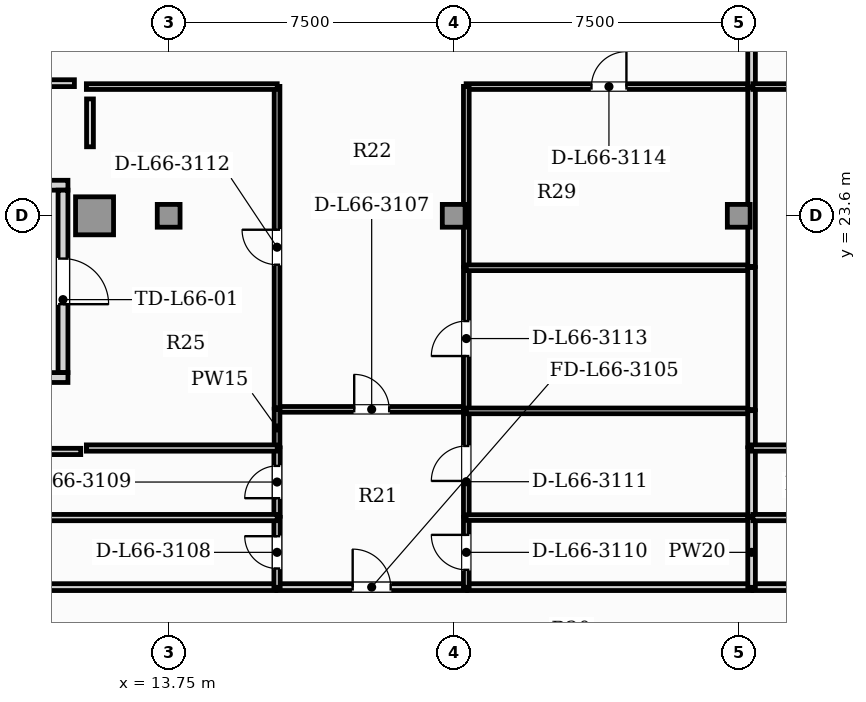
"""IFC4 building model, lengths in metres.
Left out: names, types, materials, properties, quantities, classifications, styles, units other than length and angle.
Written with IfcOpenShell. Run it as: python <this file> out.ifc"""

import sys

from ifc_helpers import new_model, si_unit, direction, frame, frame_2d, origin, origin_2d, place, context, subcontext, project, spatial, rectangle, hollow_rectangle, extrude, element, fill, save


model = new_model("IFC4")
c1 = context("Model", 3, precision=1e-05, world=origin(), true_north=direction((0.0, 1.0)))
c2 = subcontext(c1, "Body", "Model", "MODEL_VIEW")
j1 = project(units=[si_unit("LENGTHUNIT", "METRE"), si_unit("PLANEANGLEUNIT", "RADIAN")], contexts=[c1])
p1 = place(None, origin())
s1 = spatial("IfcSite", under=j1, at=p1, CompositionType="ELEMENT")
p2 = place(p1, origin())
s2 = spatial("IfcBuilding", under=s1, at=p2, CompositionType="ELEMENT")
p3 = place(p2, frame((0.0, 0.0, 268.3)))
s3 = spatial("IfcBuildingStorey", under=s2, at=p3, CompositionType="ELEMENT", Elevation=268.3)
p4 = place(p3, frame((11.8, 23.6, 0.0), z_axis=(0.0, 0.0, 1.0), x_axis=(1.0, 0.0, 0.0)))
e1 = element("IfcColumn", 1, at=p4, inside=s3, PredefinedType="USERDEFINED", context=c2, shape_type="SweptSolid", body=[
    extrude(hollow_rectangle(XDim=1.0, YDim=1.0, WallThickness=0.06, at=origin_2d()), origin(), (0.0, 0.0, 1.0), 3.85),
])
for number, where, z_axis, x_axis in (
    (2, (13.75, 23.6, 0.0), (0.0, 0.0, 1.0), (1.0, 0.0, 0.0)),
    (3, (21.25, 23.6, 0.0), (0.0, 0.0, 1.0), (1.0, 0.0, 0.0)),
    (4, (28.75, 23.6, 0.0), (0.0, 0.0, 1.0), (1.0, 0.0, 0.0)),
):
    element("IfcColumn", number, at=place(p3, frame(where, z_axis=z_axis, x_axis=x_axis)), inside=s3, PredefinedType="COLUMN", context=c2, shape_type="SweptSolid", body=[
        extrude(rectangle(XDim=0.6, YDim=0.6, at=origin_2d()), origin(), (0.0, 0.0, 1.0), 3.85),
    ])
p5 = place(p3, frame((8.18, 24.405, 0.0), z_axis=(0.0, 0.0, 1.0), x_axis=(1.0, 0.0, 0.0)))
e5 = element("IfcWall", 5, at=p5, inside=s3, PredefinedType="SOLIDWALL", context=c2, shape_type="SweptSolid", body=[
    extrude(rectangle(XDim=2.92, YDim=0.26, at=frame_2d((1.46, 0.0))), origin(), (0.0, 0.0, 1.0), 3.65),
])
p6 = place(p3, frame((10.97, 24.275, 0.0), z_axis=(0.0, 0.0, 1.0), x_axis=(0.0, -1.0, 0.0)))
e6 = element("IfcWall", 6, at=p6, inside=s3, PredefinedType="SOLIDWALL", context=c2, shape_type="SweptSolid", body=[
    extrude(rectangle(XDim=4.8, YDim=0.26, at=frame_2d((2.4, 0.0))), origin(), (0.0, 0.0, 1.0), 3.19),
])
p7 = place(p6, frame((1.8, 0.0, 0.0)))
e7 = element("IfcOpeningElement", 7, at=p7, cuts=e6, PredefinedType="OPENING", context=c2, shape_type="SweptSolid", body=[
    extrude(rectangle(XDim=1.2, YDim=2.2, at=frame_2d((0.6, 1.1))), frame((0.0, 0.14, 0.0), z_axis=(0.0, -1.0, 0.0), x_axis=(1.0, 0.0, 0.0)), (0.0, 0.0, 1.0), 0.28),
])
p8 = place(p3, frame((11.1, 19.345, 0.0), z_axis=(0.0, 0.0, 1.0), x_axis=(-1.0, 0.0, 0.0)))
e8 = element("IfcWall", 8, at=p8, inside=s3, PredefinedType="SOLIDWALL", context=c2, shape_type="SweptSolid", body=[
    extrude(rectangle(XDim=2.92, YDim=0.26, at=frame_2d((1.46, 0.0))), origin(), (0.0, 0.0, 1.0), 3.65),
])
p9 = place(p3, frame((16.597, 13.83, 0.0), z_axis=(0.0, 0.0, 1.0), x_axis=(1.0, 0.0, 0.0)))
e9 = element("IfcWall", 9, at=p9, inside=s3, PredefinedType="PARTITIONING", context=c2, shape_type="SweptSolid", body=[
    extrude(rectangle(XDim=4.99, YDim=0.18, at=frame_2d((2.495, 0.0))), origin(), (0.0, 0.0, 1.0), 3.65),
])
p10 = place(p9, frame((1.995, 0.0, 0.0)))
e10 = element("IfcOpeningElement", 10, at=p10, cuts=e9, PredefinedType="OPENING", context=c2, shape_type="SweptSolid", body=[
    extrude(rectangle(XDim=1.0, YDim=2.15, at=frame_2d((0.5, 1.075))), frame((0.0, 0.1, 0.0), z_axis=(0.0, -1.0, 0.0), x_axis=(1.0, 0.0, 0.0)), (0.0, 0.0, 1.0), 0.2),
])
p11 = place(p3, frame((8.289, 13.83, 0.0), z_axis=(0.0, 0.0, 1.0), x_axis=(1.0, 0.0, 0.0)))
e11 = element("IfcWall", 11, at=p11, inside=s3, PredefinedType="PARTITIONING", context=c2, shape_type="SweptSolid", body=[
    extrude(rectangle(XDim=8.278, YDim=0.18, at=frame_2d((4.139, 0.0))), origin(), (0.0, 0.0, 1.0), 3.65),
])
p12 = place(p3, frame((21.617, 13.83, 0.0), z_axis=(0.0, 0.0, 1.0), x_axis=(1.0, 0.0, 0.0)))
e12 = element("IfcWall", 12, at=p12, inside=s3, PredefinedType="PARTITIONING", context=c2, shape_type="SweptSolid", body=[
    extrude(rectangle(XDim=7.476, YDim=0.18, at=frame_2d((3.738, 0.0))), origin(), (0.0, 0.0, 1.0), 3.65),
])
p13 = place(p3, frame((29.123, 13.83, 0.0), z_axis=(0.0, 0.0, 1.0), x_axis=(1.0, 0.0, 0.0)))
e13 = element("IfcWall", 13, at=p13, inside=s3, PredefinedType="PARTITIONING", context=c2, shape_type="SweptSolid", body=[
    extrude(rectangle(XDim=7.181, YDim=0.18, at=frame_2d((3.591, 0.0))), origin(), (0.0, 0.0, 1.0), 3.65),
])
p14 = place(p3, frame((16.597, 18.507, 0.0), z_axis=(0.0, 0.0, 1.0), x_axis=(1.0, 0.0, 0.0)))
e14 = element("IfcWall", 14, at=p14, inside=s3, PredefinedType="PARTITIONING", context=c2, shape_type="SweptSolid", body=[
    extrude(rectangle(XDim=4.99, YDim=0.15, at=frame_2d((2.495, 0.0))), origin(), (0.0, 0.0, 1.0), 3.65),
])
p15 = place(p14, frame((2.035, 0.0, 0.0)))
e15 = element("IfcOpeningElement", 15, at=p15, cuts=e14, PredefinedType="OPENING", context=c2, shape_type="SweptSolid", body=[
    extrude(rectangle(XDim=0.92, YDim=2.1, at=frame_2d((0.46, 1.05))), frame((0.0, 0.085, 0.0), z_axis=(0.0, -1.0, 0.0), x_axis=(1.0, 0.0, 0.0)), (0.0, 0.0, 1.0), 0.17),
])
p16 = place(p3, frame((16.602, 13.825, 0.0), z_axis=(0.0, 0.0, 1.0), x_axis=(0.0, 1.0, 0.0)))
e16 = element("IfcWall", 16, at=p16, inside=s3, PredefinedType="PLUMBINGWALL", context=c2, shape_type="SweptSolid", body=[
    extrude(rectangle(XDim=1.84, YDim=0.165, at=frame_2d((0.92, 0.0))), origin(), (0.0, 0.0, 1.0), 3.65),
])
p17 = place(p16, frame((0.495, 0.0, 0.0)))
e17 = element("IfcOpeningElement", 17, at=p17, cuts=e16, PredefinedType="OPENING", context=c2, shape_type="SweptSolid", body=[
    extrude(rectangle(XDim=0.85, YDim=2.1, at=frame_2d((0.425, 1.05))), frame((0.0, 0.093, 0.0), z_axis=(0.0, -1.0, 0.0), x_axis=(1.0, 0.0, 0.0)), (0.0, 0.0, 1.0), 0.185),
])
p18 = place(p3, frame((16.602, 15.695, 0.0), z_axis=(0.0, 0.0, 1.0), x_axis=(0.0, 1.0, 0.0)))
e18 = element("IfcWall", 18, at=p18, inside=s3, PredefinedType="PLUMBINGWALL", context=c2, shape_type="SweptSolid", body=[
    extrude(rectangle(XDim=1.8, YDim=0.165, at=frame_2d((0.9, 0.0))), origin(), (0.0, 0.0, 1.0), 3.65),
])
p19 = place(p18, frame((0.475, 0.0, 0.0)))
e19 = element("IfcOpeningElement", 19, at=p19, cuts=e18, PredefinedType="OPENING", context=c2, shape_type="SweptSolid", body=[
    extrude(rectangle(XDim=0.85, YDim=2.1, at=frame_2d((0.425, 1.05))), frame((0.0, 0.093, 0.0), z_axis=(0.0, -1.0, 0.0), x_axis=(1.0, 0.0, 0.0)), (0.0, 0.0, 1.0), 0.185),
])
p20 = place(p3, frame((16.602, 17.525, 0.0), z_axis=(0.0, 0.0, 1.0), x_axis=(0.0, 1.0, 0.0)))
e20 = element("IfcWall", 20, at=p20, inside=s3, PredefinedType="PARTITIONING", context=c2, shape_type="SweptSolid", body=[
    extrude(rectangle(XDim=0.987, YDim=0.15, at=frame_2d((0.494, 0.0))), origin(), (0.0, 0.0, 1.0), 3.65),
])
p21 = place(p3, frame((21.582, 13.825, 0.0), z_axis=(0.0, 0.0, 1.0), x_axis=(0.0, 1.0, 0.0)))
e21 = element("IfcWall", 21, at=p21, inside=s3, PredefinedType="PARTITIONING", context=c2, shape_type="SweptSolid", body=[
    extrude(rectangle(XDim=1.84, YDim=0.15, at=frame_2d((0.92, 0.0))), origin(), (0.0, 0.0, 1.0), 3.65),
])
p22 = place(p21, frame((0.46, 0.0, 0.0)))
e22 = element("IfcOpeningElement", 22, at=p22, cuts=e21, PredefinedType="OPENING", context=c2, shape_type="SweptSolid", body=[
    extrude(rectangle(XDim=0.92, YDim=2.1, at=frame_2d((0.46, 1.05))), frame((0.0, 0.085, 0.0), z_axis=(0.0, -1.0, 0.0), x_axis=(1.0, 0.0, 0.0)), (0.0, 0.0, 1.0), 0.17),
])
p23 = place(p3, frame((21.582, 15.695, 0.0), z_axis=(0.0, 0.0, 1.0), x_axis=(0.0, 1.0, 0.0)))
e23 = element("IfcWall", 23, at=p23, inside=s3, PredefinedType="PARTITIONING", context=c2, shape_type="SweptSolid", body=[
    extrude(rectangle(XDim=2.777, YDim=0.15, at=frame_2d((1.389, 0.0))), origin(), (0.0, 0.0, 1.0), 3.65),
])
p24 = place(p23, frame((0.929, 0.0, 0.0)))
e24 = element("IfcOpeningElement", 24, at=p24, cuts=e23, PredefinedType="OPENING", context=c2, shape_type="SweptSolid", body=[
    extrude(rectangle(XDim=0.92, YDim=2.1, at=frame_2d((0.46, 1.05))), frame((0.0, 0.085, 0.0), z_axis=(0.0, -1.0, 0.0), x_axis=(1.0, 0.0, 0.0)), (0.0, 0.0, 1.0), 0.17),
])
p25 = place(p3, frame((16.602, 18.542, 0.0), z_axis=(0.0, 0.0, 1.0), x_axis=(0.0, 1.0, 0.0)))
e25 = element("IfcWall", 25, at=p25, inside=s3, PredefinedType="PARTITIONING", context=c2, shape_type="SweptSolid", body=[
    extrude(rectangle(XDim=8.463, YDim=0.15, at=frame_2d((4.231, 0.0))), origin(), (0.0, 0.0, 1.0), 3.65),
])
p26 = place(p25, frame((3.771, 0.0, 0.0)))
e26 = element("IfcOpeningElement", 26, at=p26, cuts=e25, PredefinedType="OPENING", context=c2, shape_type="SweptSolid", body=[
    extrude(rectangle(XDim=0.92, YDim=2.1, at=frame_2d((0.46, 1.05))), frame((0.0, 0.085, 0.0), z_axis=(0.0, -1.0, 0.0), x_axis=(1.0, 0.0, 0.0)), (0.0, 0.0, 1.0), 0.17),
])
p27 = place(p3, frame((11.585, 27.0, 0.0), z_axis=(0.0, 0.0, 1.0), x_axis=(1.0, 0.0, 0.0)))
e27 = element("IfcWall", 27, at=p27, inside=s3, PredefinedType="PARTITIONING", context=c2, shape_type="SweptSolid", body=[
    extrude(rectangle(XDim=5.022, YDim=0.15, at=frame_2d((2.511, 0.0))), origin(), (0.0, 0.0, 1.0), 3.65),
])
p28 = place(p3, frame((21.582, 18.502, 0.0), z_axis=(0.0, 0.0, 1.0), x_axis=(0.0, 1.0, 0.0)))
e28 = element("IfcWall", 28, at=p28, inside=s3, PredefinedType="PARTITIONING", context=c2, shape_type="SweptSolid", body=[
    extrude(rectangle(XDim=3.736, YDim=0.15, at=frame_2d((1.868, 0.0))), origin(), (0.0, 0.0, 1.0), 3.65),
])
p29 = place(p28, frame((1.408, 0.0, 0.0)))
e29 = element("IfcOpeningElement", 29, at=p29, cuts=e28, PredefinedType="OPENING", context=c2, shape_type="SweptSolid", body=[
    extrude(rectangle(XDim=0.92, YDim=2.1, at=frame_2d((0.46, 1.05))), frame((0.0, 0.085, 0.0), z_axis=(0.0, -1.0, 0.0), x_axis=(1.0, 0.0, 0.0)), (0.0, 0.0, 1.0), 0.17),
])
p30 = place(p3, frame((21.577, 27.0, 0.0), z_axis=(0.0, 0.0, 1.0), x_axis=(1.0, 0.0, 0.0)))
e30 = element("IfcWall", 30, at=p30, inside=s3, PredefinedType="PARTITIONING", context=c2, shape_type="SweptSolid", body=[
    extrude(rectangle(XDim=7.516, YDim=0.15, at=frame_2d((3.758, 0.0))), origin(), (0.0, 0.0, 1.0), 3.65),
])
p31 = place(p30, frame((3.298, 0.0, 0.0)))
e31 = element("IfcOpeningElement", 31, at=p31, cuts=e30, PredefinedType="OPENING", context=c2, shape_type="SweptSolid", body=[
    extrude(rectangle(XDim=0.92, YDim=2.1, at=frame_2d((0.46, 1.05))), frame((0.0, 0.085, 0.0), z_axis=(0.0, -1.0, 0.0), x_axis=(1.0, 0.0, 0.0)), (0.0, 0.0, 1.0), 0.17),
])
p32 = place(p3, frame((21.582, 22.268, 0.0), z_axis=(0.0, 0.0, 1.0), x_axis=(0.0, 1.0, 0.0)))
e32 = element("IfcWall", 32, at=p32, inside=s3, PredefinedType="PARTITIONING", context=c2, shape_type="SweptSolid", body=[
    extrude(rectangle(XDim=4.737, YDim=0.15, at=frame_2d((2.368, 0.0))), origin(), (0.0, 0.0, 1.0), 3.65),
])
p33 = place(p3, frame((29.088, 26.995, 0.0), z_axis=(0.0, 0.0, 1.0), x_axis=(0.0, 1.0, 0.0)))
e33 = element("IfcWall", 33, at=p33, inside=s3, PredefinedType="PARTITIONING", context=c2, shape_type="SweptSolid", body=[
    extrude(rectangle(XDim=1.51, YDim=0.2, at=frame_2d((0.755, 0.0))), origin(), (0.0, 0.0, 1.0), 3.65),
])
p34 = place(p3, frame((8.289, 15.66, 0.0), z_axis=(0.0, 0.0, 1.0), x_axis=(1.0, 0.0, 0.0)))
e34 = element("IfcWall", 34, at=p34, inside=s3, PredefinedType="PLUMBINGWALL", context=c2, shape_type="SweptSolid", body=[
    extrude(rectangle(XDim=8.318, YDim=0.165, at=frame_2d((4.159, 0.0))), origin(), (0.0, 0.0, 1.0), 3.65),
])
p35 = place(p3, frame((11.585, 17.49, 0.0), z_axis=(0.0, 0.0, 1.0), x_axis=(1.0, 0.0, 0.0)))
e35 = element("IfcWall", 35, at=p35, inside=s3, PredefinedType="PLUMBINGWALL", context=c2, shape_type="SweptSolid", body=[
    extrude(rectangle(XDim=5.022, YDim=0.165, at=frame_2d((2.511, 0.0))), origin(), (0.0, 0.0, 1.0), 3.65),
])
p36 = place(p3, frame((21.577, 15.66, 0.0), z_axis=(0.0, 0.0, 1.0), x_axis=(1.0, 0.0, 0.0)))
e36 = element("IfcWall", 36, at=p36, inside=s3, PredefinedType="PARTITIONING", context=c2, shape_type="SweptSolid", body=[
    extrude(rectangle(XDim=7.516, YDim=0.15, at=frame_2d((3.758, 0.0))), origin(), (0.0, 0.0, 1.0), 3.65),
])
p37 = place(p3, frame((29.088, 13.825, 0.0), z_axis=(0.0, 0.0, 1.0), x_axis=(0.0, 1.0, 0.0)))
e37 = element("IfcWall", 37, at=p37, inside=s3, PredefinedType="PARTITIONING", context=c2, shape_type="SweptSolid", body=[
    extrude(rectangle(XDim=1.84, YDim=0.2, at=frame_2d((0.92, 0.0))), origin(), (0.0, 0.0, 1.0), 3.65),
])
p38 = place(p3, frame((21.577, 18.468, 0.0), z_axis=(0.0, 0.0, 1.0), x_axis=(1.0, 0.0, 0.0)))
e38 = element("IfcWall", 38, at=p38, inside=s3, PredefinedType="PARTITIONING", context=c2, shape_type="SweptSolid", body=[
    extrude(rectangle(XDim=7.516, YDim=0.15, at=frame_2d((3.758, 0.0))), origin(), (0.0, 0.0, 1.0), 3.65),
])
p39 = place(p3, frame((29.088, 15.695, 0.0), z_axis=(0.0, 0.0, 1.0), x_axis=(0.0, 1.0, 0.0)))
e39 = element("IfcWall", 39, at=p39, inside=s3, PredefinedType="PARTITIONING", context=c2, shape_type="SweptSolid", body=[
    extrude(rectangle(XDim=1.8, YDim=0.2, at=frame_2d((0.9, 0.0))), origin(), (0.0, 0.0, 1.0), 3.65),
])
p40 = place(p3, frame((29.088, 17.525, 0.0), z_axis=(0.0, 0.0, 1.0), x_axis=(0.0, 1.0, 0.0)))
e40 = element("IfcWall", 40, at=p40, inside=s3, PredefinedType="PARTITIONING", context=c2, shape_type="SweptSolid", body=[
    extrude(rectangle(XDim=0.948, YDim=0.2, at=frame_2d((0.474, 0.0))), origin(), (0.0, 0.0, 1.0), 3.65),
])
p41 = place(p3, frame((21.577, 22.233, 0.0), z_axis=(0.0, 0.0, 1.0), x_axis=(1.0, 0.0, 0.0)))
e41 = element("IfcWall", 41, at=p41, inside=s3, PredefinedType="PARTITIONING", context=c2, shape_type="SweptSolid", body=[
    extrude(rectangle(XDim=7.516, YDim=0.15, at=frame_2d((3.758, 0.0))), origin(), (0.0, 0.0, 1.0), 3.65),
])
p42 = place(p3, frame((29.088, 18.502, 0.0), z_axis=(0.0, 0.0, 1.0), x_axis=(0.0, 1.0, 0.0)))
e42 = element("IfcWall", 42, at=p42, inside=s3, PredefinedType="PARTITIONING", context=c2, shape_type="SweptSolid", body=[
    extrude(rectangle(XDim=3.736, YDim=0.2, at=frame_2d((1.868, 0.0))), origin(), (0.0, 0.0, 1.0), 3.65),
])
p43 = place(p3, frame((29.088, 22.268, 0.0), z_axis=(0.0, 0.0, 1.0), x_axis=(0.0, 1.0, 0.0)))
e43 = element("IfcWall", 43, at=p43, inside=s3, PredefinedType="PARTITIONING", context=c2, shape_type="SweptSolid", body=[
    extrude(rectangle(XDim=4.697, YDim=0.2, at=frame_2d((2.349, 0.0))), origin(), (0.0, 0.0, 1.0), 3.65),
])
p44 = place(p3, frame((29.123, 27.0, 0.0), z_axis=(0.0, 0.0, 1.0), x_axis=(1.0, 0.0, 0.0)))
e44 = element("IfcWall", 44, at=p44, inside=s3, PredefinedType="PARTITIONING", context=c2, shape_type="SweptSolid", body=[
    extrude(rectangle(XDim=7.221, YDim=0.15, at=frame_2d((3.611, 0.0))), origin(), (0.0, 0.0, 1.0), 3.65),
])
p45 = place(p3, frame((29.123, 15.66, 0.0), z_axis=(0.0, 0.0, 1.0), x_axis=(1.0, 0.0, 0.0)))
e45 = element("IfcWall", 45, at=p45, inside=s3, PredefinedType="PLUMBINGWALL", context=c2, shape_type="SweptSolid", body=[
    extrude(rectangle(XDim=7.221, YDim=0.165, at=frame_2d((3.611, 0.0))), origin(), (0.0, 0.0, 1.0), 3.65),
])
p46 = place(p3, frame((29.083, 17.49, 0.0), z_axis=(0.0, 0.0, 1.0), x_axis=(1.0, 0.0, 0.0)))
e46 = element("IfcWall", 46, at=p46, inside=s3, PredefinedType="PLUMBINGWALL", context=c2, shape_type="SweptSolid", body=[
    extrude(rectangle(XDim=7.261, YDim=0.165, at=frame_2d((3.631, 0.0))), origin(), (0.0, 0.0, 1.0), 3.65),
])
p47 = place(p3, frame((11.27, 27.09, 0.0), z_axis=(0.0, 0.0, 1.0), x_axis=(-1.0, 0.0, 0.0)))
e47 = element("IfcWall", 47, at=p47, inside=s3, PredefinedType="PARTITIONING", context=c2, shape_type="SweptSolid", body=[
    extrude(rectangle(XDim=2.981, YDim=0.18, at=frame_2d((1.49, 0.0))), origin(), (0.0, 0.0, 1.0), 3.65),
])
p48 = place(p3, frame((8.289, 17.4, 0.0), z_axis=(0.0, 0.0, 1.0), x_axis=(1.0, 0.0, 0.0)))
e48 = element("IfcWall", 48, at=p48, inside=s3, PredefinedType="PLUMBINGWALL", context=c2, shape_type="SweptSolid", body=[
    extrude(rectangle(XDim=3.147, YDim=0.165, at=frame_2d((1.573, 0.0))), origin(), (0.0, 0.0, 1.0), 3.65),
])
p49 = place(p3, frame((11.68, 25.417, 0.0), z_axis=(0.0, 0.0, 1.0), x_axis=(0.0, 1.0, 0.0)))
e49 = element("IfcWall", 49, at=p49, inside=s3, PredefinedType="PARTITIONING", context=c2, shape_type="SweptSolid", body=[
    extrude(rectangle(XDim=1.259, YDim=0.18, at=frame_2d((0.629, 0.0))), origin(), (0.0, 0.0, 1.0), 3.65),
])
p50 = place(p7, frame((1.2, 0.0, 0.0), z_axis=(0.0, 0.0, 1.0), x_axis=(-1.0, 0.0, 0.0)))
e50 = element("IfcDoor", 50, at=p50, inside=s3, OperationType="SINGLE_SWING_LEFT", PredefinedType="DOOR", context=c2, shape_type="SweptSolid", body=[
    extrude(rectangle(XDim=1.2, YDim=2.2, at=frame_2d((0.6, 1.1))), frame((0.0, 0.025, 0.0), z_axis=(0.0, -1.0, 0.0), x_axis=(1.0, 0.0, 0.0)), (0.0, 0.0, 1.0), 0.05),
])
fill(e7, e50)
p51 = place(p10, origin())
e51 = element("IfcDoor", 51, at=p51, inside=s3, OperationType="SINGLE_SWING_LEFT", PredefinedType="DOOR", context=c2, shape_type="SweptSolid", body=[
    extrude(rectangle(XDim=1.0, YDim=2.15, at=frame_2d((0.5, 1.075))), frame((0.0, 0.025, 0.0), z_axis=(0.0, -1.0, 0.0), x_axis=(1.0, 0.0, 0.0)), (0.0, 0.0, 1.0), 0.05),
])
fill(e10, e51)
p52 = place(p15, origin())
e52 = element("IfcDoor", 52, at=p52, inside=s3, OperationType="SINGLE_SWING_LEFT", PredefinedType="DOOR", context=c2, shape_type="SweptSolid", body=[
    extrude(rectangle(XDim=0.92, YDim=2.1, at=frame_2d((0.46, 1.05))), frame((0.0, 0.025, 0.0), z_axis=(0.0, -1.0, 0.0), x_axis=(1.0, 0.0, 0.0)), (0.0, 0.0, 1.0), 0.05),
])
fill(e15, e52)
p53 = place(p17, origin())
e53 = element("IfcDoor", 53, at=p53, inside=s3, OperationType="SINGLE_SWING_RIGHT", PredefinedType="DOOR", context=c2, shape_type="SweptSolid", body=[
    extrude(rectangle(XDim=0.85, YDim=2.1, at=frame_2d((0.425, 1.05))), frame((0.0, 0.025, 0.0), z_axis=(0.0, -1.0, 0.0), x_axis=(1.0, 0.0, 0.0)), (0.0, 0.0, 1.0), 0.05),
])
fill(e17, e53)
p54 = place(p19, origin())
e54 = element("IfcDoor", 54, at=p54, inside=s3, OperationType="SINGLE_SWING_LEFT", PredefinedType="DOOR", context=c2, shape_type="SweptSolid", body=[
    extrude(rectangle(XDim=0.85, YDim=2.1, at=frame_2d((0.425, 1.05))), frame((0.0, 0.025, 0.0), z_axis=(0.0, -1.0, 0.0), x_axis=(1.0, 0.0, 0.0)), (0.0, 0.0, 1.0), 0.05),
])
fill(e19, e54)
p55 = place(p22, origin())
e55 = element("IfcDoor", 55, at=p55, inside=s3, OperationType="SINGLE_SWING_RIGHT", PredefinedType="DOOR", context=c2, shape_type="SweptSolid", body=[
    extrude(rectangle(XDim=0.92, YDim=2.1, at=frame_2d((0.46, 1.05))), frame((0.0, 0.025, 0.0), z_axis=(0.0, -1.0, 0.0), x_axis=(1.0, 0.0, 0.0)), (0.0, 0.0, 1.0), 0.05),
])
fill(e22, e55)
p56 = place(p24, origin())
e56 = element("IfcDoor", 56, at=p56, inside=s3, OperationType="SINGLE_SWING_LEFT", PredefinedType="DOOR", context=c2, shape_type="SweptSolid", body=[
    extrude(rectangle(XDim=0.92, YDim=2.1, at=frame_2d((0.46, 1.05))), frame((0.0, 0.025, 0.0), z_axis=(0.0, -1.0, 0.0), x_axis=(1.0, 0.0, 0.0)), (0.0, 0.0, 1.0), 0.05),
])
fill(e24, e56)
p57 = place(p26, origin())
e57 = element("IfcDoor", 57, at=p57, inside=s3, OperationType="SINGLE_SWING_RIGHT", PredefinedType="DOOR", context=c2, shape_type="SweptSolid", body=[
    extrude(rectangle(XDim=0.92, YDim=2.1, at=frame_2d((0.46, 1.05))), frame((0.0, 0.025, 0.0), z_axis=(0.0, -1.0, 0.0), x_axis=(1.0, 0.0, 0.0)), (0.0, 0.0, 1.0), 0.05),
])
fill(e26, e57)
p58 = place(p29, origin())
e58 = element("IfcDoor", 58, at=p58, inside=s3, OperationType="SINGLE_SWING_LEFT", PredefinedType="DOOR", context=c2, shape_type="SweptSolid", body=[
    extrude(rectangle(XDim=0.92, YDim=2.1, at=frame_2d((0.46, 1.05))), frame((0.0, 0.025, 0.0), z_axis=(0.0, -1.0, 0.0), x_axis=(1.0, 0.0, 0.0)), (0.0, 0.0, 1.0), 0.05),
])
fill(e29, e58)
p59 = place(p31, origin())
e59 = element("IfcDoor", 59, at=p59, inside=s3, OperationType="SINGLE_SWING_RIGHT", PredefinedType="DOOR", context=c2, shape_type="SweptSolid", body=[
    extrude(rectangle(XDim=0.92, YDim=2.1, at=frame_2d((0.46, 1.05))), frame((0.0, 0.025, 0.0), z_axis=(0.0, -1.0, 0.0), x_axis=(1.0, 0.0, 0.0)), (0.0, 0.0, 1.0), 0.05),
])
fill(e31, e59)
save(model, sys.argv[1])
